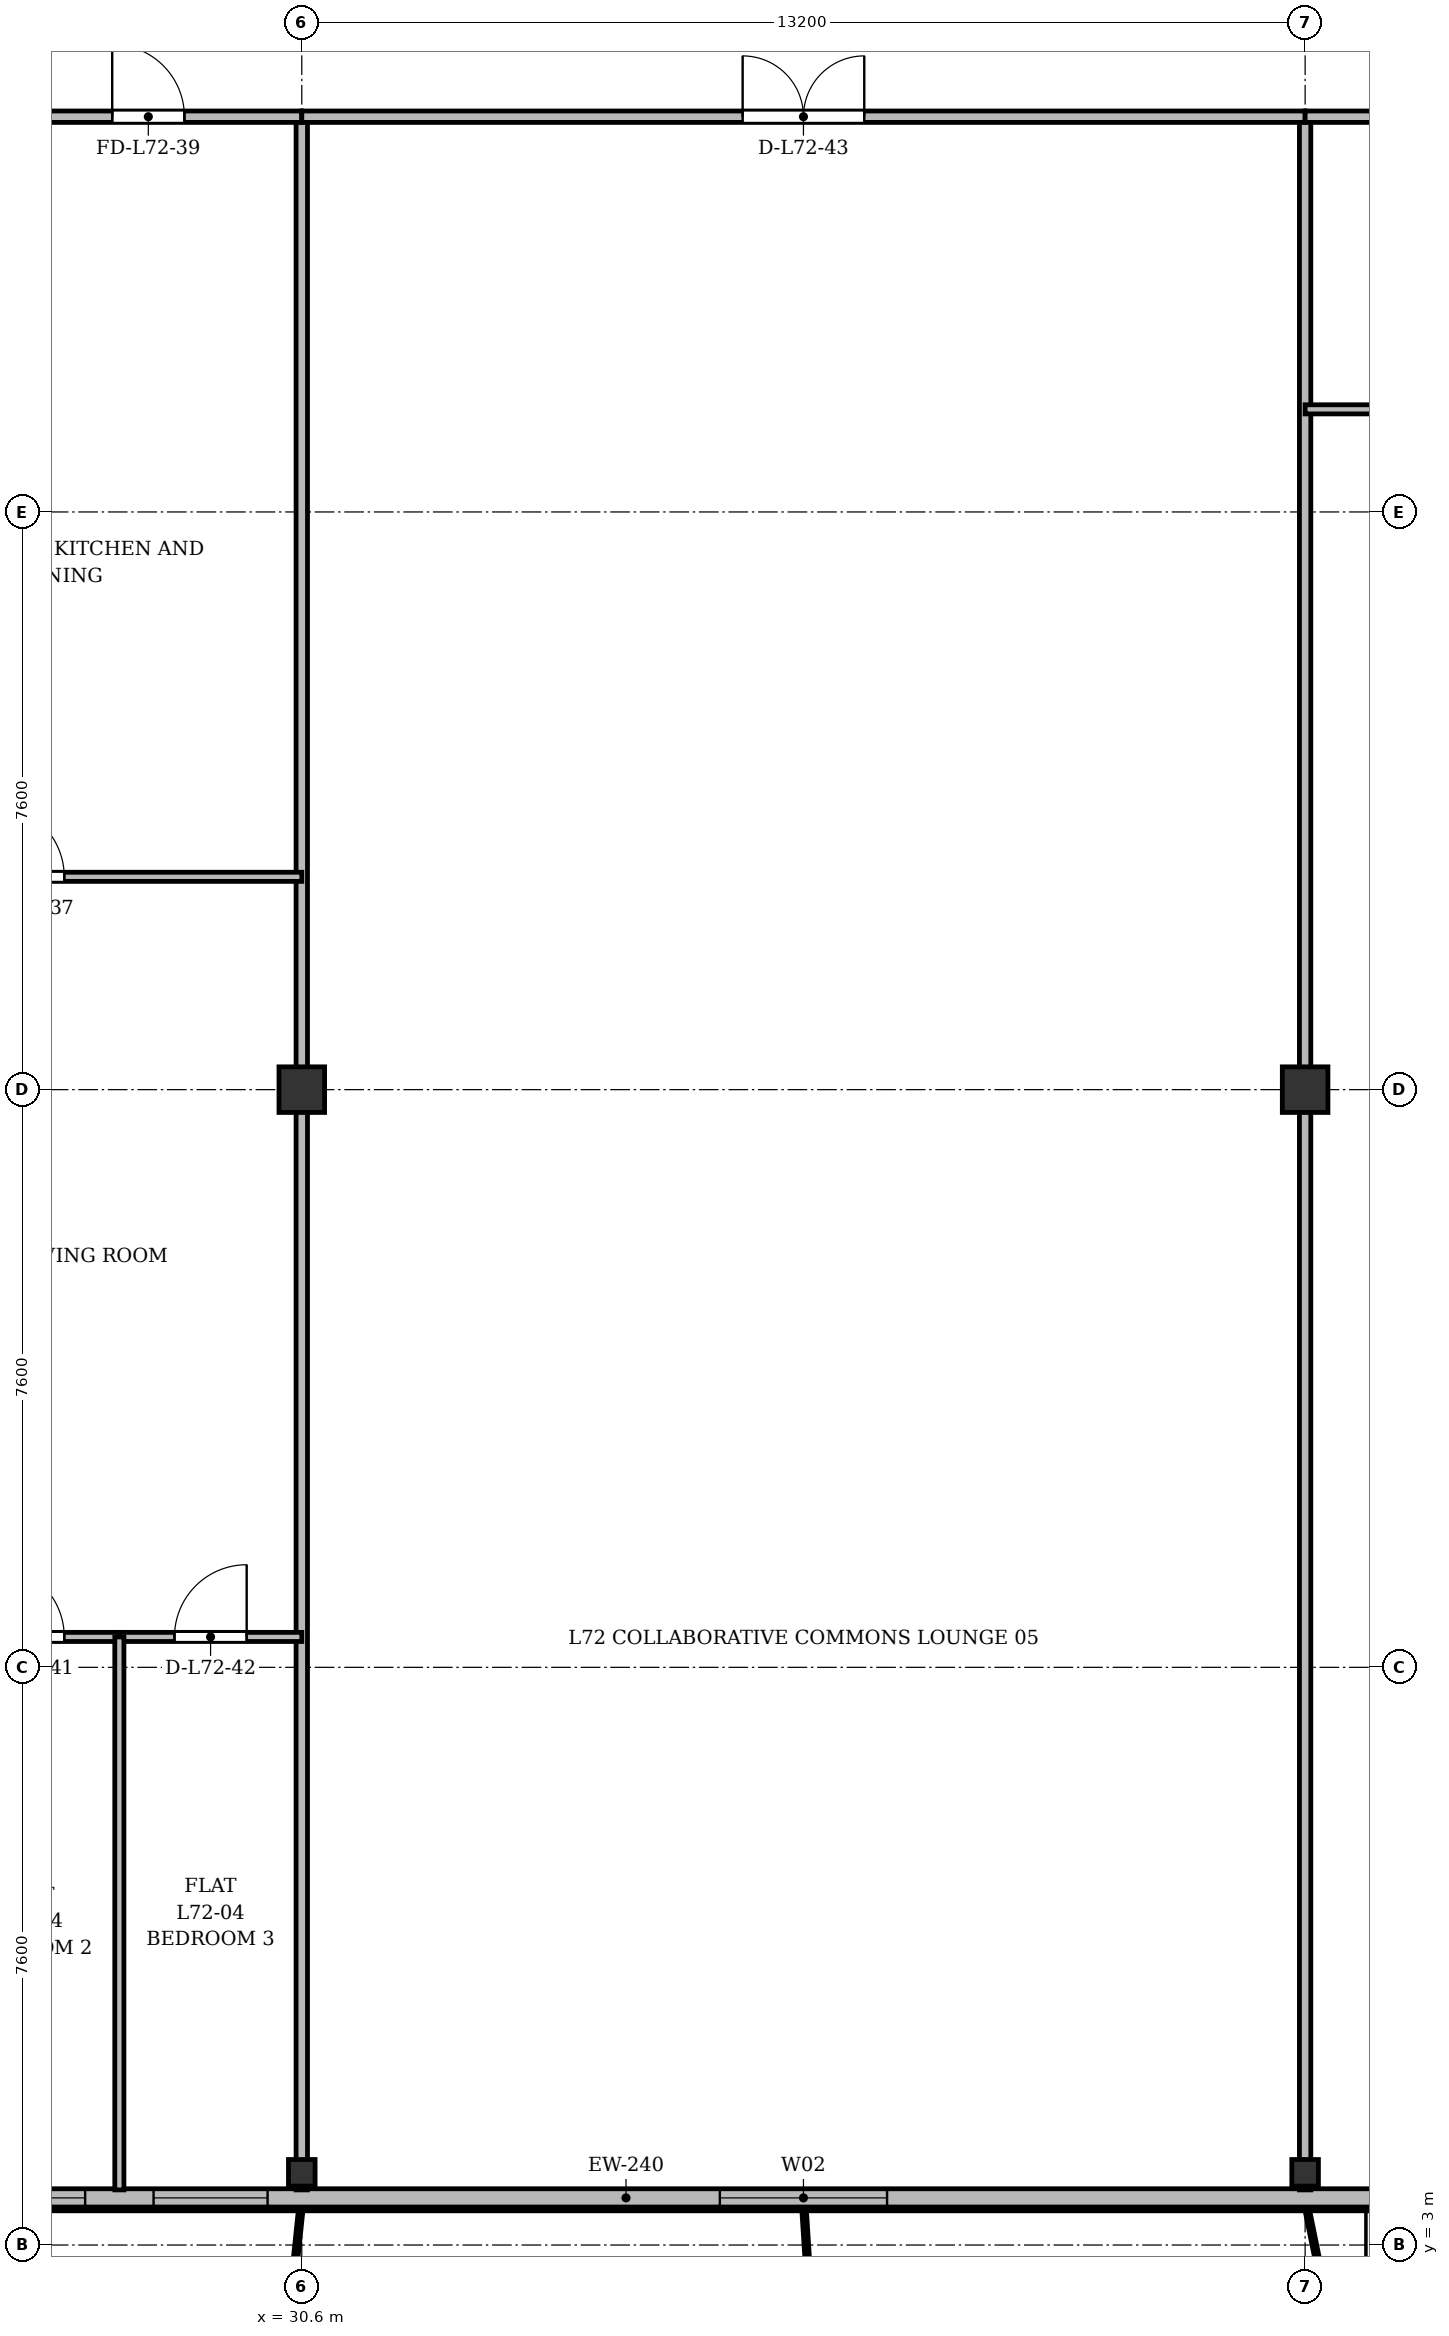
"""IFC4 building model, lengths in metres.
Left out: names, types, materials, properties, quantities, classifications, styles, units other than length and angle.
Written with IfcOpenShell. Run it as: python <this file> out.ifc"""

import sys

from ifc_helpers import new_model, si_unit, direction, frame, frame_2d, origin, origin_2d, place, context, subcontext, project, spatial, rectangle, i_section, extrude, source, transform, mapped, element, fill, save


model = new_model("IFC4")
c1 = context("Model", 3, precision=1e-05, world=origin(), true_north=direction((0.0, 1.0)))
c2 = subcontext(c1, "Body", "Model", "MODEL_VIEW")
j1 = project(units=[si_unit("LENGTHUNIT", "METRE"), si_unit("PLANEANGLEUNIT", "RADIAN")], contexts=[c1])
p1 = place(None, origin())
s1 = spatial("IfcSite", under=j1, at=p1, CompositionType="ELEMENT")
p2 = place(p1, origin())
s2 = spatial("IfcBuilding", under=s1, at=p2, CompositionType="ELEMENT")
p3 = place(p2, frame((0.0, 0.0, 277.5)))
s3 = spatial("IfcBuildingStorey", under=s2, at=p3, CompositionType="ELEMENT", Elevation=277.5)
m1 = source(origin(), c2, "Body", "SweptSolid", [
    extrude(i_section(OverallWidth=0.35, OverallDepth=0.35, WebThickness=0.018, FlangeThickness=0.028, at=origin_2d()), origin(), (0.0, 0.0, 1.0), 3.6),
])
p4 = place(p3, frame((30.6, 3.95, 0.0), z_axis=(0.0, 0.0, 1.0), x_axis=(1.0, 0.0, 0.0)))
e1 = element("IfcColumn", 1, at=p4, inside=s3, PredefinedType="COLUMN", context=c2, shape_type="MappedRepresentation", body=[
    mapped(m1, transform((0.0, 0.0, 0.0), x_axis=(1.0, 0.0, 0.0), y_axis=(0.0, 1.0, 0.0), z_axis=(0.0, 0.0, 1.0), scale=1.0)),
])
m2 = source(origin(), c2, "Body", "SweptSolid", [
    extrude(rectangle(XDim=0.6, YDim=0.6, at=origin_2d()), origin(), (0.0, 0.0, 1.0), 3.6),
])
p5 = place(p3, frame((30.6, 18.2, 0.0), z_axis=(0.0, 0.0, 1.0), x_axis=(1.0, 0.0, 0.0)))
e2 = element("IfcColumn", 2, at=p5, inside=s3, PredefinedType="COLUMN", context=c2, shape_type="MappedRepresentation", body=[
    mapped(m2, transform((0.0, 0.0, 0.0), x_axis=(1.0, 0.0, 0.0), y_axis=(0.0, 1.0, 0.0), z_axis=(0.0, 0.0, 1.0), scale=1.0)),
])
p6 = place(p3, frame((43.8, 3.95, 0.0), z_axis=(0.0, 0.0, 1.0), x_axis=(1.0, 0.0, 0.0)))
e3 = element("IfcColumn", 3, at=p6, inside=s3, PredefinedType="COLUMN", context=c2, shape_type="MappedRepresentation", body=[
    mapped(m1, transform((0.0, 0.0, 0.0), x_axis=(1.0, 0.0, 0.0), y_axis=(0.0, 1.0, 0.0), z_axis=(0.0, 0.0, 1.0), scale=1.0)),
])
p7 = place(p3, frame((43.8, 18.2, 0.0), z_axis=(0.0, 0.0, 1.0), x_axis=(1.0, 0.0, 0.0)))
e4 = element("IfcColumn", 4, at=p7, inside=s3, PredefinedType="COLUMN", context=c2, shape_type="MappedRepresentation", body=[
    mapped(m2, transform((0.0, 0.0, 0.0), x_axis=(1.0, 0.0, 0.0), y_axis=(0.0, 1.0, 0.0), z_axis=(0.0, 0.0, 1.0), scale=1.0)),
])
p8 = place(p3, frame((63.2, 3.62, 0.0), z_axis=(0.0, 0.0, 1.0), x_axis=(-1.0, 0.0, 0.0)))
e5 = element("IfcWall", 5, at=p8, inside=s3, PredefinedType="SOLIDWALL", context=c2, shape_type="SweptSolid", body=[
    extrude(rectangle(XDim=52.0, YDim=0.24, at=frame_2d((26.0, 0.0))), origin(), (0.0, 0.0, 1.0), 3.37),
])
p9 = place(p8, frame((1.495, 0.0, 0.9)))
e6 = element("IfcOpeningElement", 6, at=p9, cuts=e5, PredefinedType="OPENING", context=c2, shape_type="SweptSolid", body=[
    extrude(rectangle(XDim=1.5, YDim=1.75, at=frame_2d((0.75, 0.875))), frame((0.0, 0.13, 0.0), z_axis=(0.0, -1.0, 0.0), x_axis=(1.0, 0.0, 0.0)), (0.0, 0.0, 1.0), 0.26),
])
p10 = place(p8, frame((5.2, 0.0, 0.9)))
e7 = element("IfcOpeningElement", 7, at=p10, cuts=e5, PredefinedType="OPENING", context=c2, shape_type="SweptSolid", body=[
    extrude(rectangle(XDim=2.0, YDim=1.95, at=frame_2d((1.0, 0.975))), frame((0.0, 0.13, 0.0), z_axis=(0.0, -1.0, 0.0), x_axis=(1.0, 0.0, 0.0)), (0.0, 0.0, 1.0), 0.26),
])
p11 = place(p8, frame((9.275, 0.0, 0.9)))
e8 = element("IfcOpeningElement", 8, at=p11, cuts=e5, PredefinedType="OPENING", context=c2, shape_type="SweptSolid", body=[
    extrude(rectangle(XDim=1.65, YDim=1.85, at=frame_2d((0.825, 0.925))), frame((0.0, 0.13, 0.0), z_axis=(0.0, -1.0, 0.0), x_axis=(1.0, 0.0, 0.0)), (0.0, 0.0, 1.0), 0.26),
])
p12 = place(p8, frame((14.017, 0.0, 0.0)))
e9 = element("IfcOpeningElement", 9, at=p12, cuts=e5, PredefinedType="OPENING", context=c2, shape_type="SweptSolid", body=[
    extrude(rectangle(XDim=1.2, YDim=2.2, at=frame_2d((0.6, 1.1))), frame((0.0, 0.13, 0.0), z_axis=(0.0, -1.0, 0.0), x_axis=(1.0, 0.0, 0.0)), (0.0, 0.0, 1.0), 0.26),
])
p13 = place(p8, frame((24.9, 0.0, 0.9)))
e10 = element("IfcOpeningElement", 10, at=p13, cuts=e5, PredefinedType="OPENING", context=c2, shape_type="SweptSolid", body=[
    extrude(rectangle(XDim=2.2, YDim=1.8, at=frame_2d((1.1, 0.9))), frame((0.0, 0.13, 0.0), z_axis=(0.0, -1.0, 0.0), x_axis=(1.0, 0.0, 0.0)), (0.0, 0.0, 1.0), 0.26),
])
p14 = place(p8, frame((33.05, 0.0, 0.9)))
e11 = element("IfcOpeningElement", 11, at=p14, cuts=e5, PredefinedType="OPENING", context=c2, shape_type="SweptSolid", body=[
    extrude(rectangle(XDim=1.5, YDim=1.75, at=frame_2d((0.75, 0.875))), frame((0.0, 0.13, 0.0), z_axis=(0.0, -1.0, 0.0), x_axis=(1.0, 0.0, 0.0)), (0.0, 0.0, 1.0), 0.26),
])
p15 = place(p8, frame((35.45, 0.0, 0.9)))
e12 = element("IfcOpeningElement", 12, at=p15, cuts=e5, PredefinedType="OPENING", context=c2, shape_type="SweptSolid", body=[
    extrude(rectangle(XDim=1.5, YDim=1.75, at=frame_2d((0.75, 0.875))), frame((0.0, 0.13, 0.0), z_axis=(0.0, -1.0, 0.0), x_axis=(1.0, 0.0, 0.0)), (0.0, 0.0, 1.0), 0.26),
])
p16 = place(p8, frame((37.775, 0.0, 0.9)))
e13 = element("IfcOpeningElement", 13, at=p16, cuts=e5, PredefinedType="OPENING", context=c2, shape_type="SweptSolid", body=[
    extrude(rectangle(XDim=1.65, YDim=1.85, at=frame_2d((0.825, 0.925))), frame((0.0, 0.13, 0.0), z_axis=(0.0, -1.0, 0.0), x_axis=(1.0, 0.0, 0.0)), (0.0, 0.0, 1.0), 0.26),
])
p17 = place(p8, frame((41.452, 0.0, 0.0)))
e14 = element("IfcOpeningElement", 14, at=p17, cuts=e5, PredefinedType="OPENING", context=c2, shape_type="SweptSolid", body=[
    extrude(rectangle(XDim=1.2, YDim=2.2, at=frame_2d((0.6, 1.1))), frame((0.0, 0.13, 0.0), z_axis=(0.0, -1.0, 0.0), x_axis=(1.0, 0.0, 0.0)), (0.0, 0.0, 1.0), 0.26),
])
p18 = place(p8, frame((44.3, 0.0, 0.9)))
e15 = element("IfcOpeningElement", 15, at=p18, cuts=e5, PredefinedType="OPENING", context=c2, shape_type="SweptSolid", body=[
    extrude(rectangle(XDim=2.2, YDim=1.8, at=frame_2d((1.1, 0.9))), frame((0.0, 0.13, 0.0), z_axis=(0.0, -1.0, 0.0), x_axis=(1.0, 0.0, 0.0)), (0.0, 0.0, 1.0), 0.26),
])
p19 = place(p8, frame((49.005, 0.0, 0.9)))
e16 = element("IfcOpeningElement", 16, at=p19, cuts=e5, PredefinedType="OPENING", context=c2, shape_type="SweptSolid", body=[
    extrude(rectangle(XDim=1.5, YDim=1.75, at=frame_2d((0.75, 0.875))), frame((0.0, 0.13, 0.0), z_axis=(0.0, -1.0, 0.0), x_axis=(1.0, 0.0, 0.0)), (0.0, 0.0, 1.0), 0.26),
])
for number, where, z_axis, x_axis in (
    (17, (30.6, 3.725, 0.0), (0.0, 0.0, 1.0), (0.0, 1.0, 0.0)),
    (18, (43.8, 3.725, 0.0), (0.0, 0.0, 1.0), (0.0, 1.0, 0.0)),
):
    element("IfcWall", number, at=place(p3, frame(where, z_axis=z_axis, x_axis=x_axis)), inside=s3, PredefinedType="PARTITIONING", context=c2, shape_type="SweptSolid", body=[
        extrude(rectangle(XDim=27.275, YDim=0.15, at=frame_2d((13.637, 0.0))), origin(), (0.0, 0.0, 1.0), 2.87),
    ])
p20 = place(p3, frame((23.4, 21.0, 0.0), z_axis=(0.0, 0.0, 1.0), x_axis=(1.0, 0.0, 0.0)))
e19 = element("IfcWall", 19, at=p20, inside=s3, PredefinedType="PARTITIONING", context=c2, shape_type="SweptSolid", body=[
    extrude(rectangle(XDim=7.2, YDim=0.12, at=frame_2d((3.6, 0.0))), origin(), (0.0, 0.0, 1.0), 2.87),
])
p21 = place(p20, frame((3.125, 0.0, 0.0)))
e20 = element("IfcOpeningElement", 20, at=p21, cuts=e19, PredefinedType="OPENING", context=c2, shape_type="SweptSolid", body=[
    extrude(rectangle(XDim=0.95, YDim=2.15, at=frame_2d((0.475, 1.075))), frame((0.0, 0.07, 0.0), z_axis=(0.0, -1.0, 0.0), x_axis=(1.0, 0.0, 0.0)), (0.0, 0.0, 1.0), 0.14),
])
p22 = place(p3, frame((23.4, 31.0, 0.0), z_axis=(0.0, 0.0, 1.0), x_axis=(1.0, 0.0, 0.0)))
e21 = element("IfcWall", 21, at=p22, inside=s3, PredefinedType="PARTITIONING", context=c2, shape_type="SweptSolid", body=[
    extrude(rectangle(XDim=7.2, YDim=0.15, at=frame_2d((3.6, 0.0))), origin(), (0.0, 0.0, 1.0), 2.87),
])
p23 = place(p22, frame((4.706, 0.0, 0.0)))
e22 = element("IfcOpeningElement", 22, at=p23, cuts=e21, PredefinedType="OPENING", context=c2, shape_type="SweptSolid", body=[
    extrude(rectangle(XDim=0.95, YDim=2.15, at=frame_2d((0.475, 1.075))), frame((0.0, 0.085, 0.0), z_axis=(0.0, -1.0, 0.0), x_axis=(1.0, 0.0, 0.0)), (0.0, 0.0, 1.0), 0.17),
])
p24 = place(p3, frame((25.8, 11.0, 0.0), z_axis=(0.0, 0.0, 1.0), x_axis=(1.0, 0.0, 0.0)))
e23 = element("IfcWall", 23, at=p24, inside=s3, PredefinedType="PARTITIONING", context=c2, shape_type="SweptSolid", body=[
    extrude(rectangle(XDim=2.4, YDim=0.12, at=frame_2d((1.2, 0.0))), origin(), (0.0, 0.0, 1.0), 3.07),
])
p25 = place(p24, frame((0.725, 0.0, 0.0)))
e24 = element("IfcOpeningElement", 24, at=p25, cuts=e23, PredefinedType="OPENING", context=c2, shape_type="SweptSolid", body=[
    extrude(rectangle(XDim=0.95, YDim=2.15, at=frame_2d((0.475, 1.075))), frame((0.0, 0.07, 0.0), z_axis=(0.0, -1.0, 0.0), x_axis=(1.0, 0.0, 0.0)), (0.0, 0.0, 1.0), 0.14),
])
p26 = place(p3, frame((28.2, 11.0, 0.0), z_axis=(0.0, 0.0, 1.0), x_axis=(1.0, 0.0, 0.0)))
e25 = element("IfcWall", 25, at=p26, inside=s3, PredefinedType="PARTITIONING", context=c2, shape_type="SweptSolid", body=[
    extrude(rectangle(XDim=2.4, YDim=0.12, at=frame_2d((1.2, 0.0))), origin(), (0.0, 0.0, 1.0), 2.87),
])
p27 = place(p26, frame((0.725, 0.0, 0.0)))
e26 = element("IfcOpeningElement", 26, at=p27, cuts=e25, PredefinedType="OPENING", context=c2, shape_type="SweptSolid", body=[
    extrude(rectangle(XDim=0.95, YDim=2.15, at=frame_2d((0.475, 1.075))), frame((0.0, 0.07, 0.0), z_axis=(0.0, -1.0, 0.0), x_axis=(1.0, 0.0, 0.0)), (0.0, 0.0, 1.0), 0.14),
])
p28 = place(p3, frame((28.2, 3.725, 0.0), z_axis=(0.0, 0.0, 1.0), x_axis=(0.0, 1.0, 0.0)))
e27 = element("IfcWall", 27, at=p28, inside=s3, PredefinedType="PARTITIONING", context=c2, shape_type="SweptSolid", body=[
    extrude(rectangle(XDim=7.275, YDim=0.12, at=frame_2d((3.637, 0.0))), origin(), (0.0, 0.0, 1.0), 2.92),
])
p29 = place(p3, frame((30.6, 31.0, 0.0), z_axis=(0.0, 0.0, 1.0), x_axis=(1.0, 0.0, 0.0)))
e28 = element("IfcWall", 28, at=p29, inside=s3, PredefinedType="PARTITIONING", context=c2, shape_type="SweptSolid", body=[
    extrude(rectangle(XDim=13.2, YDim=0.15, at=frame_2d((6.6, 0.0))), origin(), (0.0, 0.0, 1.0), 2.87),
])
p30 = place(p29, frame((5.8, 0.0, 0.0)))
e29 = element("IfcOpeningElement", 29, at=p30, cuts=e28, PredefinedType="OPENING", context=c2, shape_type="SweptSolid", body=[
    extrude(rectangle(XDim=1.6, YDim=2.2, at=frame_2d((0.8, 1.1))), frame((0.0, 0.085, 0.0), z_axis=(0.0, -1.0, 0.0), x_axis=(1.0, 0.0, 0.0)), (0.0, 0.0, 1.0), 0.17),
])
p31 = place(p3, frame((43.8, 31.0, 0.0), z_axis=(0.0, 0.0, 1.0), x_axis=(1.0, 0.0, 0.0)))
e30 = element("IfcWall", 30, at=p31, inside=s3, PredefinedType="PARTITIONING", context=c2, shape_type="SweptSolid", body=[
    extrude(rectangle(XDim=7.2, YDim=0.15, at=frame_2d((3.6, 0.0))), origin(), (0.0, 0.0, 1.0), 2.87),
])
p32 = place(p31, frame((3.125, 0.0, 0.0)))
e31 = element("IfcOpeningElement", 31, at=p32, cuts=e30, PredefinedType="OPENING", context=c2, shape_type="SweptSolid", body=[
    extrude(rectangle(XDim=0.95, YDim=2.15, at=frame_2d((0.475, 1.075))), frame((0.0, 0.085, 0.0), z_axis=(0.0, -1.0, 0.0), x_axis=(1.0, 0.0, 0.0)), (0.0, 0.0, 1.0), 0.17),
])
p33 = place(p3, frame((43.8, 27.15, 0.0), z_axis=(0.0, 0.0, 1.0), x_axis=(1.0, 0.0, 0.0)))
e32 = element("IfcWall", 32, at=p33, inside=s3, PredefinedType="PARTITIONING", context=c2, shape_type="SweptSolid", body=[
    extrude(rectangle(XDim=7.2, YDim=0.12, at=frame_2d((3.6, 0.0))), origin(), (0.0, 0.0, 1.0), 2.87),
])
p34 = place(p33, frame((3.125, 0.0, 0.0)))
e33 = element("IfcOpeningElement", 33, at=p34, cuts=e32, PredefinedType="OPENING", context=c2, shape_type="SweptSolid", body=[
    extrude(rectangle(XDim=0.95, YDim=2.15, at=frame_2d((0.475, 1.075))), frame((0.0, 0.07, 0.0), z_axis=(0.0, -1.0, 0.0), x_axis=(1.0, 0.0, 0.0)), (0.0, 0.0, 1.0), 0.14),
])
m3 = source(origin(), c2, "Body", "SweptSolid", [
    extrude(rectangle(XDim=2.2, YDim=1.8, at=frame_2d((1.1, 0.9))), frame((0.0, 0.03, 0.0), z_axis=(0.0, -1.0, 0.0), x_axis=(1.0, 0.0, 0.0)), (0.0, 0.0, 1.0), 0.06),
])
p35 = place(p13, origin())
e34 = element("IfcWindow", 34, at=p35, inside=s3, PartitioningType="SINGLE_PANEL", PredefinedType="WINDOW", context=c2, shape_type="MappedRepresentation", body=[
    mapped(m3, transform((0.0, 0.0, 0.0), x_axis=(1.0, 0.0, 0.0), y_axis=(0.0, 1.0, 0.0), z_axis=(0.0, 0.0, 1.0), scale=1.0)),
])
fill(e10, e34)
m4 = source(origin(), c2, "Body", "SweptSolid", [
    extrude(rectangle(XDim=1.5, YDim=1.75, at=frame_2d((0.75, 0.875))), frame((0.0, 0.03, 0.0), z_axis=(0.0, -1.0, 0.0), x_axis=(1.0, 0.0, 0.0)), (0.0, 0.0, 1.0), 0.06),
])
p36 = place(p14, origin())
e35 = element("IfcWindow", 35, at=p36, inside=s3, PartitioningType="SINGLE_PANEL", PredefinedType="WINDOW", context=c2, shape_type="MappedRepresentation", body=[
    mapped(m4, transform((0.0, 0.0, 0.0), x_axis=(1.0, 0.0, 0.0), y_axis=(0.0, 1.0, 0.0), z_axis=(0.0, 0.0, 1.0), scale=1.0)),
])
fill(e11, e35)
p37 = place(p15, origin())
e36 = element("IfcWindow", 36, at=p37, inside=s3, PartitioningType="SINGLE_PANEL", PredefinedType="WINDOW", context=c2, shape_type="MappedRepresentation", body=[
    mapped(m4, transform((0.0, 0.0, 0.0), x_axis=(1.0, 0.0, 0.0), y_axis=(0.0, 1.0, 0.0), z_axis=(0.0, 0.0, 1.0), scale=1.0)),
])
fill(e12, e36)
m5 = source(origin(), c2, "Body", "SweptSolid", [
    extrude(rectangle(XDim=0.95, YDim=2.15, at=frame_2d((0.475, 1.075))), frame((0.0, 0.025, 0.0), z_axis=(0.0, -1.0, 0.0), x_axis=(1.0, 0.0, 0.0)), (0.0, 0.0, 1.0), 0.05),
])
p38 = place(p21, origin())
e37 = element("IfcDoor", 37, at=p38, inside=s3, OperationType="SINGLE_SWING_LEFT", PredefinedType="DOOR", context=c2, shape_type="MappedRepresentation", body=[
    mapped(m5, transform((0.0, 0.0, 0.0), x_axis=(1.0, 0.0, 0.0), y_axis=(0.0, 1.0, 0.0), z_axis=(0.0, 0.0, 1.0), scale=1.0)),
])
fill(e20, e37)
p39 = place(p23, origin())
e38 = element("IfcDoor", 38, at=p39, inside=s3, OperationType="SINGLE_SWING_LEFT", PredefinedType="DOOR", context=c2, shape_type="MappedRepresentation", body=[
    mapped(m5, transform((0.0, 0.0, 0.0), x_axis=(1.0, 0.0, 0.0), y_axis=(0.0, 1.0, 0.0), z_axis=(0.0, 0.0, 1.0), scale=1.0)),
])
fill(e22, e38)
p40 = place(p25, origin())
e39 = element("IfcDoor", 39, at=p40, inside=s3, OperationType="SINGLE_SWING_LEFT", PredefinedType="DOOR", context=c2, shape_type="MappedRepresentation", body=[
    mapped(m5, transform((0.0, 0.0, 0.0), x_axis=(1.0, 0.0, 0.0), y_axis=(0.0, 1.0, 0.0), z_axis=(0.0, 0.0, 1.0), scale=1.0)),
])
fill(e24, e39)
p41 = place(p27, origin())
e40 = element("IfcDoor", 40, at=p41, inside=s3, OperationType="SINGLE_SWING_RIGHT", PredefinedType="DOOR", context=c2, shape_type="MappedRepresentation", body=[
    mapped(m5, transform((0.0, 0.0, 0.0), x_axis=(1.0, 0.0, 0.0), y_axis=(0.0, 1.0, 0.0), z_axis=(0.0, 0.0, 1.0), scale=1.0)),
])
fill(e26, e40)
m6 = source(origin(), c2, "Body", "SweptSolid", [
    extrude(rectangle(XDim=1.6, YDim=2.2, at=frame_2d((0.8, 1.1))), frame((0.0, 0.025, 0.0), z_axis=(0.0, -1.0, 0.0), x_axis=(1.0, 0.0, 0.0)), (0.0, 0.0, 1.0), 0.05),
])
p42 = place(p30, origin())
e41 = element("IfcDoor", 41, at=p42, inside=s3, OperationType="DOUBLE_DOOR_SINGLE_SWING", PredefinedType="DOOR", context=c2, shape_type="MappedRepresentation", body=[
    mapped(m6, transform((0.0, 0.0, 0.0), x_axis=(1.0, 0.0, 0.0), y_axis=(0.0, 1.0, 0.0), z_axis=(0.0, 0.0, 1.0), scale=1.0)),
])
fill(e29, e41)
save(model, sys.argv[1])
